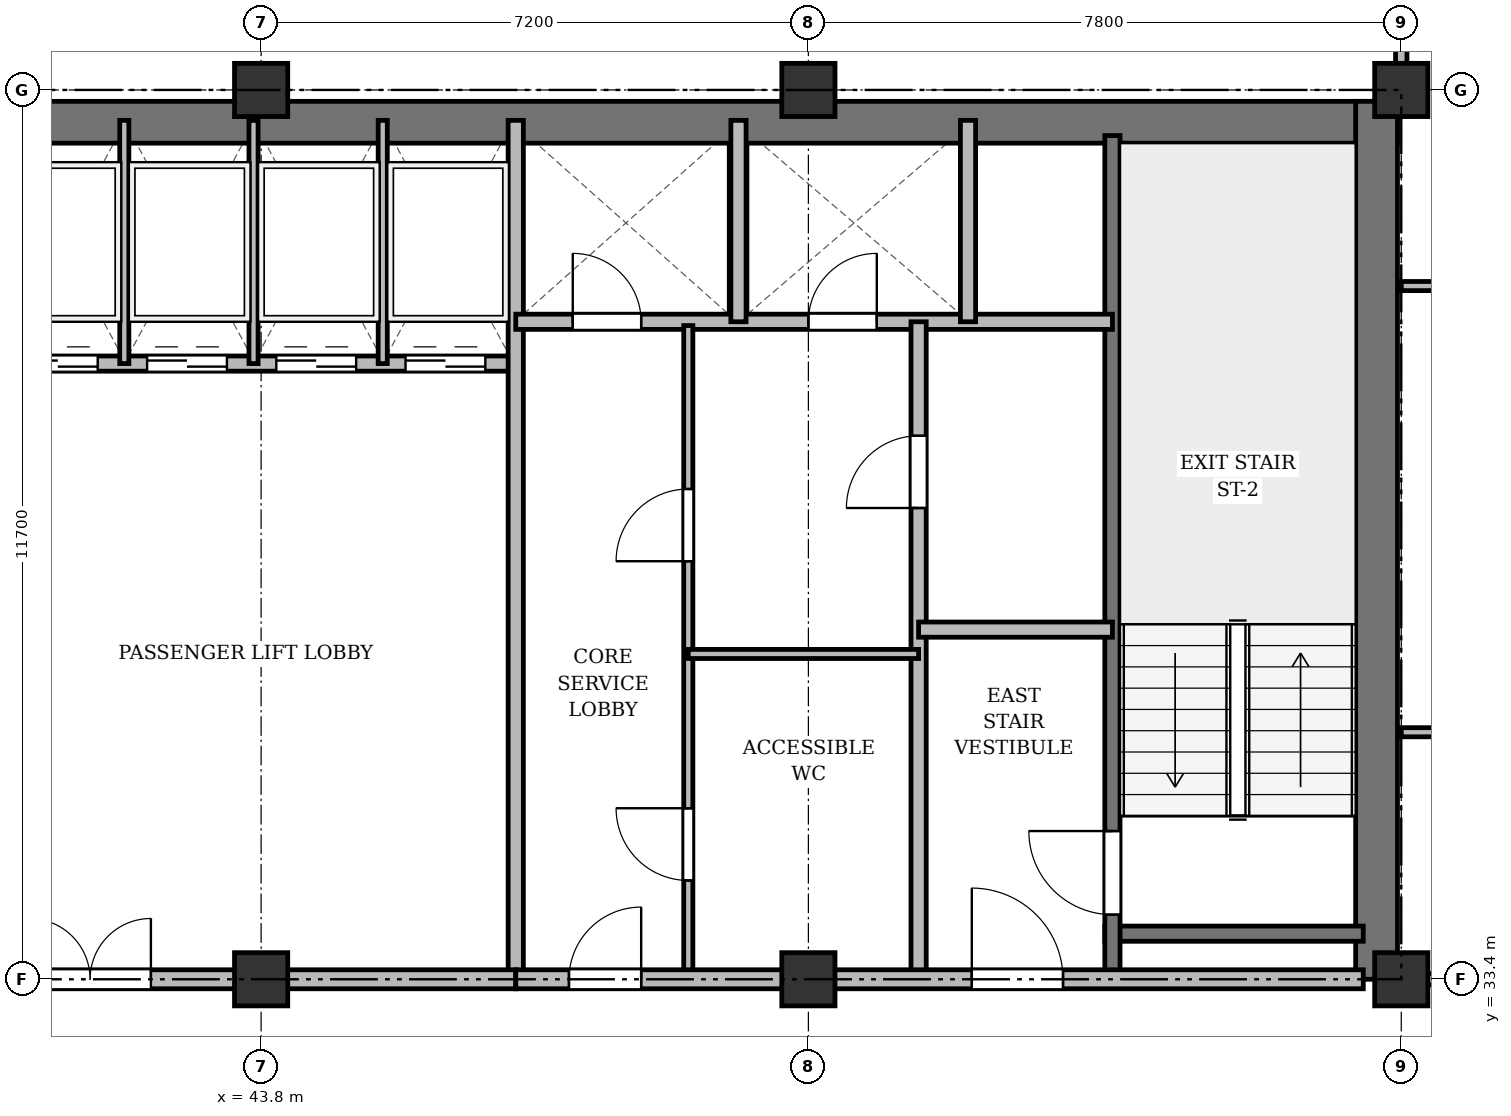
"""IFC4 building model, lengths in metres.
Left out: names, types, materials, properties, quantities, classifications, styles, units other than length and angle.
Written with IfcOpenShell. Run it as: python <this file> out.ifc"""

import sys

from ifc_helpers import new_model, si_unit, direction, frame, frame_2d, origin, origin_2d, place, context, subcontext, project, spatial, rectangle, extrude, source, transform, mapped, element, fill, save


model = new_model("IFC4")
c1 = context("Model", 3, precision=1e-05, world=origin(), true_north=direction((0.0, 1.0)))
c2 = subcontext(c1, "Body", "Model", "MODEL_VIEW")
j1 = project(units=[si_unit("LENGTHUNIT", "METRE"), si_unit("PLANEANGLEUNIT", "RADIAN")], contexts=[c1])
p1 = place(None, origin())
s1 = spatial("IfcSite", under=j1, at=p1, CompositionType="ELEMENT")
p2 = place(p1, origin())
s2 = spatial("IfcBuilding", under=s1, at=p2, CompositionType="ELEMENT")
p3 = place(p2, frame((0.0, 0.0, 226.5)))
s3 = spatial("IfcBuildingStorey", under=s2, at=p3, CompositionType="ELEMENT", Elevation=226.5)
m1 = source(origin(), c2, "Body", "SweptSolid", [
    extrude(rectangle(XDim=0.7, YDim=0.7, at=origin_2d()), origin(), (0.0, 0.0, 1.0), 3.6),
])
for number, where, z_axis, x_axis in (
    (1, (43.8, 33.4, 0.0), (0.0, 0.0, 1.0), (1.0, 0.0, 0.0)),
    (2, (43.8, 45.1, 0.0), (0.0, 0.0, 1.0), (1.0, 0.0, 0.0)),
    (3, (51.0, 33.4, 0.0), (0.0, 0.0, 1.0), (1.0, 0.0, 0.0)),
    (4, (51.0, 45.1, 0.0), (0.0, 0.0, 1.0), (1.0, 0.0, 0.0)),
    (5, (58.8, 33.4, 0.0), (0.0, 0.0, 1.0), (1.0, 0.0, 0.0)),
    (6, (58.8, 45.1, 0.0), (0.0, 0.0, 1.0), (1.0, 0.0, 0.0)),
):
    element("IfcColumn", number, at=place(p3, frame(where, z_axis=z_axis, x_axis=x_axis)), inside=s3, PredefinedType="COLUMN", context=c2, shape_type="MappedRepresentation", body=[
        mapped(m1, transform((0.0, 0.0, 0.0), x_axis=(1.0, 0.0, 0.0), y_axis=(0.0, 1.0, 0.0), z_axis=(0.0, 0.0, 1.0), scale=1.0)),
    ])
p4 = place(p3, frame((15.65, 44.675, 0.0), z_axis=(0.0, 0.0, 1.0), x_axis=(1.0, 0.0, 0.0)))
e7 = element("IfcWall", 7, at=p4, inside=s3, PredefinedType="SHEAR", context=c2, shape_type="SweptSolid", body=[
    extrude(rectangle(XDim=43.1, YDim=0.55, at=frame_2d((21.55, 0.0))), origin(), (0.0, 0.0, 1.0), 3.36),
])
p5 = place(p3, frame((58.475, 33.4, 0.0), z_axis=(0.0, 0.0, 1.0), x_axis=(0.0, 1.0, 0.0)))
e8 = element("IfcWall", 8, at=p5, inside=s3, PredefinedType="SHEAR", context=c2, shape_type="SweptSolid", body=[
    extrude(rectangle(XDim=11.55, YDim=0.55, at=frame_2d((5.775, 0.0))), origin(), (0.0, 0.0, 1.0), 3.36),
])
p6 = place(p3, frame((54.9, 34.0, 0.0), z_axis=(0.0, 0.0, 1.0), x_axis=(1.0, 0.0, 0.0)))
e9 = element("IfcWall", 9, at=p6, inside=s3, PredefinedType="SHEAR", context=c2, shape_type="SweptSolid", body=[
    extrude(rectangle(XDim=3.4, YDim=0.2, at=frame_2d((1.7, 0.0))), origin(), (0.0, 0.0, 1.0), 3.36),
])
p7 = place(p3, frame((55.0, 33.4, 0.0), z_axis=(0.0, 0.0, 1.0), x_axis=(0.0, 1.0, 0.0)))
e10 = element("IfcWall", 10, at=p7, inside=s3, PredefinedType="SHEAR", context=c2, shape_type="SweptSolid", body=[
    extrude(rectangle(XDim=11.1, YDim=0.2, at=frame_2d((5.55, 0.0))), origin(), (0.0, 0.0, 1.0), 3.36),
])
p8 = place(p7, frame((0.85, 0.0, 0.0)))
e11 = element("IfcOpeningElement", 11, at=p8, cuts=e10, PredefinedType="OPENING", context=c2, shape_type="SweptSolid", body=[
    extrude(rectangle(XDim=1.1, YDim=2.15, at=frame_2d((0.55, 1.075))), frame((0.0, 0.11, 0.0), z_axis=(0.0, -1.0, 0.0), x_axis=(1.0, 0.0, 0.0)), (0.0, 0.0, 1.0), 0.22),
])
p9 = place(p3, frame((40.25, 41.5, 0.0), z_axis=(0.0, 0.0, 1.0), x_axis=(1.0, 0.0, 0.0)))
e12 = element("IfcWall", 12, at=p9, inside=s3, PredefinedType="SOLIDWALL", context=c2, shape_type="SweptSolid", body=[
    extrude(rectangle(XDim=6.9, YDim=0.2, at=frame_2d((3.45, 0.0))), origin(), (0.0, 0.0, 1.0), 3.36),
])
p10 = place(p9, frame((0.35, 0.0, 0.0)))
e13 = element("IfcOpeningElement", 13, at=p10, cuts=e12, PredefinedType="OPENING", context=c2, shape_type="SweptSolid", body=[
    extrude(rectangle(XDim=1.05, YDim=2.15, at=frame_2d((0.525, 1.075))), frame((0.0, 0.11, 0.0), z_axis=(0.0, -1.0, 0.0), x_axis=(1.0, 0.0, 0.0)), (0.0, 0.0, 1.0), 0.22),
])
p11 = place(p9, frame((2.05, 0.0, 0.0)))
e14 = element("IfcOpeningElement", 14, at=p11, cuts=e12, PredefinedType="OPENING", context=c2, shape_type="SweptSolid", body=[
    extrude(rectangle(XDim=1.05, YDim=2.15, at=frame_2d((0.525, 1.075))), frame((0.0, 0.11, 0.0), z_axis=(0.0, -1.0, 0.0), x_axis=(1.0, 0.0, 0.0)), (0.0, 0.0, 1.0), 0.22),
])
p12 = place(p9, frame((3.75, 0.0, 0.0)))
e15 = element("IfcOpeningElement", 15, at=p12, cuts=e12, PredefinedType="OPENING", context=c2, shape_type="SweptSolid", body=[
    extrude(rectangle(XDim=1.05, YDim=2.15, at=frame_2d((0.525, 1.075))), frame((0.0, 0.11, 0.0), z_axis=(0.0, -1.0, 0.0), x_axis=(1.0, 0.0, 0.0)), (0.0, 0.0, 1.0), 0.22),
])
p13 = place(p9, frame((5.45, 0.0, 0.0)))
e16 = element("IfcOpeningElement", 16, at=p13, cuts=e12, PredefinedType="OPENING", context=c2, shape_type="SweptSolid", body=[
    extrude(rectangle(XDim=1.05, YDim=2.15, at=frame_2d((0.525, 1.075))), frame((0.0, 0.11, 0.0), z_axis=(0.0, -1.0, 0.0), x_axis=(1.0, 0.0, 0.0)), (0.0, 0.0, 1.0), 0.22),
])
for number, where, z_axis, x_axis in (
    (17, (42.0, 41.5, 0.0), (0.0, 0.0, 1.0), (0.0, 1.0, 0.0)),
    (18, (43.7, 41.5, 0.0), (0.0, 0.0, 1.0), (0.0, 1.0, 0.0)),
    (19, (45.4, 41.5, 0.0), (0.0, 0.0, 1.0), (0.0, 1.0, 0.0)),
):
    element("IfcWall", number, at=place(p3, frame(where, z_axis=z_axis, x_axis=x_axis)), inside=s3, PredefinedType="PARTITIONING", context=c2, shape_type="SweptSolid", body=[
        extrude(rectangle(XDim=3.2, YDim=0.12, at=frame_2d((1.6, 0.0))), origin(), (0.0, 0.0, 1.0), 3.36),
    ])
p14 = place(p3, frame((47.15, 33.4, 0.0), z_axis=(0.0, 0.0, 1.0), x_axis=(0.0, 1.0, 0.0)))
e20 = element("IfcWall", 20, at=p14, inside=s3, PredefinedType="SOLIDWALL", context=c2, shape_type="SweptSolid", body=[
    extrude(rectangle(XDim=11.3, YDim=0.2, at=frame_2d((5.65, 0.0))), origin(), (0.0, 0.0, 1.0), 2.91),
])
p15 = place(p3, frame((40.1, 33.4, 0.0), z_axis=(0.0, 0.0, 1.0), x_axis=(1.0, 0.0, 0.0)))
e21 = element("IfcWall", 21, at=p15, inside=s3, PredefinedType="PARTITIONING", context=c2, shape_type="SweptSolid", body=[
    extrude(rectangle(XDim=7.05, YDim=0.25, at=frame_2d((3.525, 0.0))), origin(), (0.0, 0.0, 1.0), 2.91),
])
p16 = place(p15, frame((0.65, 0.0, 0.0)))
e22 = element("IfcOpeningElement", 22, at=p16, cuts=e21, PredefinedType="OPENING", context=c2, shape_type="SweptSolid", body=[
    extrude(rectangle(XDim=1.6, YDim=2.2, at=frame_2d((0.8, 1.1))), frame((0.0, 0.135, 0.0), z_axis=(0.0, -1.0, 0.0), x_axis=(1.0, 0.0, 0.0)), (0.0, 0.0, 1.0), 0.27),
])
p17 = place(p3, frame((47.15, 42.05, 0.0), z_axis=(0.0, 0.0, 1.0), x_axis=(1.0, 0.0, 0.0)))
e23 = element("IfcWall", 23, at=p17, inside=s3, PredefinedType="SOLIDWALL", context=c2, shape_type="SweptSolid", body=[
    extrude(rectangle(XDim=7.85, YDim=0.2, at=frame_2d((3.925, 0.0))), origin(), (0.0, 0.0, 1.0), 2.86),
])
p18 = place(p17, frame((0.75, 0.0, 0.0)))
e24 = element("IfcOpeningElement", 24, at=p18, cuts=e23, PredefinedType="OPENING", context=c2, shape_type="SweptSolid", body=[
    extrude(rectangle(XDim=0.9, YDim=2.1, at=frame_2d((0.45, 1.05))), frame((0.0, 0.11, 0.0), z_axis=(0.0, -1.0, 0.0), x_axis=(1.0, 0.0, 0.0)), (0.0, 0.0, 1.0), 0.22),
])
p19 = place(p17, frame((3.85, 0.0, 0.0)))
e25 = element("IfcOpeningElement", 25, at=p19, cuts=e23, PredefinedType="OPENING", context=c2, shape_type="SweptSolid", body=[
    extrude(rectangle(XDim=0.9, YDim=2.1, at=frame_2d((0.45, 1.05))), frame((0.0, 0.11, 0.0), z_axis=(0.0, -1.0, 0.0), x_axis=(1.0, 0.0, 0.0)), (0.0, 0.0, 1.0), 0.22),
])
for number, where, z_axis, x_axis in (
    (26, (50.08, 42.05, 0.0), (0.0, 0.0, 1.0), (0.0, 1.0, 0.0)),
    (27, (53.1, 42.05, 0.0), (0.0, 0.0, 1.0), (0.0, 1.0, 0.0)),
):
    element("IfcWall", number, at=place(p3, frame(where, z_axis=z_axis, x_axis=x_axis)), inside=s3, PredefinedType="SOLIDWALL", context=c2, shape_type="SweptSolid", body=[
        extrude(rectangle(XDim=2.65, YDim=0.2, at=frame_2d((1.325, 0.0))), origin(), (0.0, 0.0, 1.0), 3.36),
    ])
p20 = place(p3, frame((52.45, 33.4, 0.0), z_axis=(0.0, 0.0, 1.0), x_axis=(0.0, 1.0, 0.0)))
e28 = element("IfcWall", 28, at=p20, inside=s3, PredefinedType="PARTITIONING", context=c2, shape_type="SweptSolid", body=[
    extrude(rectangle(XDim=8.65, YDim=0.2, at=frame_2d((4.325, 0.0))), origin(), (0.0, 0.0, 1.0), 2.91),
])
p21 = place(p20, frame((6.2, 0.0, 0.0)))
e29 = element("IfcOpeningElement", 29, at=p21, cuts=e28, PredefinedType="OPENING", context=c2, shape_type="SweptSolid", body=[
    extrude(rectangle(XDim=0.95, YDim=2.15, at=frame_2d((0.475, 1.075))), frame((0.0, 0.11, 0.0), z_axis=(0.0, -1.0, 0.0), x_axis=(1.0, 0.0, 0.0)), (0.0, 0.0, 1.0), 0.22),
])
p22 = place(p3, frame((52.45, 38.0, 0.0), z_axis=(0.0, 0.0, 1.0), x_axis=(1.0, 0.0, 0.0)))
e30 = element("IfcWall", 30, at=p22, inside=s3, PredefinedType="PARTITIONING", context=c2, shape_type="SweptSolid", body=[
    extrude(rectangle(XDim=2.55, YDim=0.2, at=frame_2d((1.275, 0.0))), origin(), (0.0, 0.0, 1.0), 3.36),
])
p23 = place(p3, frame((49.42, 33.4, 0.0), z_axis=(0.0, 0.0, 1.0), x_axis=(0.0, 1.0, 0.0)))
e31 = element("IfcWall", 31, at=p23, inside=s3, PredefinedType="PARTITIONING", context=c2, shape_type="SweptSolid", body=[
    extrude(rectangle(XDim=8.6, YDim=0.12, at=frame_2d((4.3, 0.0))), origin(), (0.0, 0.0, 1.0), 2.91),
])
p24 = place(p23, frame((1.3, 0.0, 0.0)))
e32 = element("IfcOpeningElement", 32, at=p24, cuts=e31, PredefinedType="OPENING", context=c2, shape_type="SweptSolid", body=[
    extrude(rectangle(XDim=0.95, YDim=2.15, at=frame_2d((0.475, 1.075))), frame((0.0, 0.07, 0.0), z_axis=(0.0, -1.0, 0.0), x_axis=(1.0, 0.0, 0.0)), (0.0, 0.0, 1.0), 0.14),
])
p25 = place(p23, frame((5.5, 0.0, 0.0)))
e33 = element("IfcOpeningElement", 33, at=p25, cuts=e31, PredefinedType="OPENING", context=c2, shape_type="SweptSolid", body=[
    extrude(rectangle(XDim=0.95, YDim=2.15, at=frame_2d((0.475, 1.075))), frame((0.0, 0.07, 0.0), z_axis=(0.0, -1.0, 0.0), x_axis=(1.0, 0.0, 0.0)), (0.0, 0.0, 1.0), 0.14),
])
p26 = place(p3, frame((49.42, 37.68, 0.0), z_axis=(0.0, 0.0, 1.0), x_axis=(1.0, 0.0, 0.0)))
e34 = element("IfcWall", 34, at=p26, inside=s3, PredefinedType="PARTITIONING", context=c2, shape_type="SweptSolid", body=[
    extrude(rectangle(XDim=3.03, YDim=0.12, at=frame_2d((1.515, 0.0))), origin(), (0.0, 0.0, 1.0), 2.86),
])
p27 = place(p3, frame((47.15, 33.4, 0.0), z_axis=(0.0, 0.0, 1.0), x_axis=(1.0, 0.0, 0.0)))
e35 = element("IfcWall", 35, at=p27, inside=s3, PredefinedType="PARTITIONING", context=c2, shape_type="SweptSolid", body=[
    extrude(rectangle(XDim=11.15, YDim=0.25, at=frame_2d((5.575, 0.0))), origin(), (0.0, 0.0, 1.0), 2.91),
])
p28 = place(p27, frame((0.7, 0.0, 0.0)))
e36 = element("IfcOpeningElement", 36, at=p28, cuts=e35, PredefinedType="OPENING", context=c2, shape_type="SweptSolid", body=[
    extrude(rectangle(XDim=0.95, YDim=2.15, at=frame_2d((0.475, 1.075))), frame((0.0, 0.135, 0.0), z_axis=(0.0, -1.0, 0.0), x_axis=(1.0, 0.0, 0.0)), (0.0, 0.0, 1.0), 0.27),
])
p29 = place(p27, frame((6.0, 0.0, 0.0)))
e37 = element("IfcOpeningElement", 37, at=p29, cuts=e35, PredefinedType="OPENING", context=c2, shape_type="SweptSolid", body=[
    extrude(rectangle(XDim=1.2, YDim=2.15, at=frame_2d((0.6, 1.075))), frame((0.0, 0.135, 0.0), z_axis=(0.0, -1.0, 0.0), x_axis=(1.0, 0.0, 0.0)), (0.0, 0.0, 1.0), 0.27),
])
p30 = place(p3, frame((58.8, 36.65, 0.0), z_axis=(0.0, 0.0, 1.0), x_axis=(1.0, 0.0, 0.0)))
e38 = element("IfcWall", 38, at=p30, inside=s3, PredefinedType="PARTITIONING", context=c2, shape_type="SweptSolid", body=[
    extrude(rectangle(XDim=2.45, YDim=0.12, at=frame_2d((1.225, 0.0))), origin(), (0.0, 0.0, 1.0), 2.86),
])
p31 = place(p3, frame((58.8, 42.52, 0.0), z_axis=(0.0, 0.0, 1.0), x_axis=(1.0, 0.0, 0.0)))
e39 = element("IfcWall", 39, at=p31, inside=s3, PredefinedType="PARTITIONING", context=c2, shape_type="SweptSolid", body=[
    extrude(rectangle(XDim=3.675, YDim=0.12, at=frame_2d((1.837, 0.0))), origin(), (0.0, 0.0, 1.0), 2.86),
])
p32 = place(p31, frame((1.559, 0.0, 0.0)))
e40 = element("IfcOpeningElement", 40, at=p32, cuts=e39, PredefinedType="OPENING", context=c2, shape_type="SweptSolid", body=[
    extrude(rectangle(XDim=0.95, YDim=2.15, at=frame_2d((0.475, 1.075))), frame((0.0, 0.07, 0.0), z_axis=(0.0, -1.0, 0.0), x_axis=(1.0, 0.0, 0.0)), (0.0, 0.0, 1.0), 0.14),
])
p33 = place(p3, frame((58.8, 33.4, 0.0), z_axis=(0.0, 0.0, 1.0), x_axis=(1.0, 0.0, 0.0)))
e41 = element("IfcWall", 41, at=p33, inside=s3, PredefinedType="PARTITIONING", context=c2, shape_type="SweptSolid", body=[
    extrude(rectangle(XDim=7.35, YDim=0.15, at=frame_2d((3.675, 0.0))), origin(), (0.0, 0.0, 1.0), 2.91),
])
p34 = place(p33, frame((4.275, 0.0, 0.0)))
e42 = element("IfcOpeningElement", 42, at=p34, cuts=e41, PredefinedType="OPENING", context=c2, shape_type="SweptSolid", body=[
    extrude(rectangle(XDim=0.95, YDim=2.15, at=frame_2d((0.475, 1.075))), frame((0.0, 0.085, 0.0), z_axis=(0.0, -1.0, 0.0), x_axis=(1.0, 0.0, 0.0)), (0.0, 0.0, 1.0), 0.17),
])
p35 = place(p3, frame((58.8, 44.75, 0.0), z_axis=(0.0, 0.0, 1.0), x_axis=(0.0, 1.0, 0.0)))
e43 = element("IfcWall", 43, at=p35, inside=s3, PredefinedType="PARTITIONING", context=c2, shape_type="SweptSolid", body=[
    extrude(rectangle(XDim=3.61, YDim=0.15, at=frame_2d((1.805, 0.0))), origin(), (0.0, 0.0, 1.0), 2.86),
])
p36 = place(p35, frame((1.1, 0.0, 0.0)))
e44 = element("IfcOpeningElement", 44, at=p36, cuts=e43, PredefinedType="OPENING", context=c2, shape_type="SweptSolid", body=[
    extrude(rectangle(XDim=0.95, YDim=2.15, at=frame_2d((0.475, 1.075))), frame((0.0, 0.085, 0.0), z_axis=(0.0, -1.0, 0.0), x_axis=(1.0, 0.0, 0.0)), (0.0, 0.0, 1.0), 0.17),
])
m2 = source(origin(), c2, "Body", "SweptSolid", [
    extrude(rectangle(XDim=1.1, YDim=2.15, at=frame_2d((0.55, 1.075))), frame((0.0, 0.025, 0.0), z_axis=(0.0, -1.0, 0.0), x_axis=(1.0, 0.0, 0.0)), (0.0, 0.0, 1.0), 0.05),
])
p37 = place(p8, origin())
e45 = element("IfcDoor", 45, at=p37, inside=s3, OperationType="SINGLE_SWING_RIGHT", PredefinedType="DOOR", context=c2, shape_type="MappedRepresentation", body=[
    mapped(m2, transform((0.0, 0.0, 0.0), x_axis=(1.0, 0.0, 0.0), y_axis=(0.0, 1.0, 0.0), z_axis=(0.0, 0.0, 1.0), scale=1.0)),
])
fill(e11, e45)
m3 = source(origin(), c2, "Body", "SweptSolid", [
    extrude(rectangle(XDim=1.05, YDim=2.15, at=frame_2d((0.525, 1.075))), frame((0.0, 0.025, 0.0), z_axis=(0.0, -1.0, 0.0), x_axis=(1.0, 0.0, 0.0)), (0.0, 0.0, 1.0), 0.05),
])
p38 = place(p10, origin())
e46 = element("IfcDoor", 46, at=p38, inside=s3, OperationType="DOUBLE_DOOR_SLIDING", PredefinedType="DOOR", context=c2, shape_type="MappedRepresentation", body=[
    mapped(m3, transform((0.0, 0.0, 0.0), x_axis=(1.0, 0.0, 0.0), y_axis=(0.0, 1.0, 0.0), z_axis=(0.0, 0.0, 1.0), scale=1.0)),
])
fill(e13, e46)
p39 = place(p11, origin())
e47 = element("IfcDoor", 47, at=p39, inside=s3, OperationType="DOUBLE_DOOR_SLIDING", PredefinedType="DOOR", context=c2, shape_type="MappedRepresentation", body=[
    mapped(m3, transform((0.0, 0.0, 0.0), x_axis=(1.0, 0.0, 0.0), y_axis=(0.0, 1.0, 0.0), z_axis=(0.0, 0.0, 1.0), scale=1.0)),
])
fill(e14, e47)
p40 = place(p12, origin())
e48 = element("IfcDoor", 48, at=p40, inside=s3, OperationType="DOUBLE_DOOR_SLIDING", PredefinedType="DOOR", context=c2, shape_type="MappedRepresentation", body=[
    mapped(m3, transform((0.0, 0.0, 0.0), x_axis=(1.0, 0.0, 0.0), y_axis=(0.0, 1.0, 0.0), z_axis=(0.0, 0.0, 1.0), scale=1.0)),
])
fill(e15, e48)
p41 = place(p13, origin())
e49 = element("IfcDoor", 49, at=p41, inside=s3, OperationType="DOUBLE_DOOR_SLIDING", PredefinedType="DOOR", context=c2, shape_type="MappedRepresentation", body=[
    mapped(m3, transform((0.0, 0.0, 0.0), x_axis=(1.0, 0.0, 0.0), y_axis=(0.0, 1.0, 0.0), z_axis=(0.0, 0.0, 1.0), scale=1.0)),
])
fill(e16, e49)
m4 = source(origin(), c2, "Body", "SweptSolid", [
    extrude(rectangle(XDim=1.6, YDim=2.2, at=frame_2d((0.8, 1.1))), frame((0.0, 0.025, 0.0), z_axis=(0.0, -1.0, 0.0), x_axis=(1.0, 0.0, 0.0)), (0.0, 0.0, 1.0), 0.05),
])
p42 = place(p16, origin())
e50 = element("IfcDoor", 50, at=p42, inside=s3, OperationType="DOUBLE_DOOR_SINGLE_SWING", PredefinedType="DOOR", context=c2, shape_type="MappedRepresentation", body=[
    mapped(m4, transform((0.0, 0.0, 0.0), x_axis=(1.0, 0.0, 0.0), y_axis=(0.0, 1.0, 0.0), z_axis=(0.0, 0.0, 1.0), scale=1.0)),
])
fill(e22, e50)
m5 = source(origin(), c2, "Body", "SweptSolid", [
    extrude(rectangle(XDim=0.9, YDim=2.1, at=frame_2d((0.45, 1.05))), frame((0.0, 0.025, 0.0), z_axis=(0.0, -1.0, 0.0), x_axis=(1.0, 0.0, 0.0)), (0.0, 0.0, 1.0), 0.05),
])
p43 = place(p18, origin())
e51 = element("IfcDoor", 51, at=p43, inside=s3, OperationType="SINGLE_SWING_LEFT", PredefinedType="DOOR", context=c2, shape_type="MappedRepresentation", body=[
    mapped(m5, transform((0.0, 0.0, 0.0), x_axis=(1.0, 0.0, 0.0), y_axis=(0.0, 1.0, 0.0), z_axis=(0.0, 0.0, 1.0), scale=1.0)),
])
fill(e24, e51)
p44 = place(p19, origin())
e52 = element("IfcDoor", 52, at=p44, inside=s3, OperationType="SINGLE_SWING_RIGHT", PredefinedType="DOOR", context=c2, shape_type="MappedRepresentation", body=[
    mapped(m5, transform((0.0, 0.0, 0.0), x_axis=(1.0, 0.0, 0.0), y_axis=(0.0, 1.0, 0.0), z_axis=(0.0, 0.0, 1.0), scale=1.0)),
])
fill(e25, e52)
m6 = source(origin(), c2, "Body", "SweptSolid", [
    extrude(rectangle(XDim=0.95, YDim=2.15, at=frame_2d((0.475, 1.075))), frame((0.0, 0.025, 0.0), z_axis=(0.0, -1.0, 0.0), x_axis=(1.0, 0.0, 0.0)), (0.0, 0.0, 1.0), 0.05),
])
p45 = place(p21, origin())
e53 = element("IfcDoor", 53, at=p45, inside=s3, OperationType="SINGLE_SWING_LEFT", PredefinedType="DOOR", context=c2, shape_type="MappedRepresentation", body=[
    mapped(m6, transform((0.0, 0.0, 0.0), x_axis=(1.0, 0.0, 0.0), y_axis=(0.0, 1.0, 0.0), z_axis=(0.0, 0.0, 1.0), scale=1.0)),
])
fill(e29, e53)
p46 = place(p24, origin())
e54 = element("IfcDoor", 54, at=p46, inside=s3, OperationType="SINGLE_SWING_RIGHT", PredefinedType="DOOR", context=c2, shape_type="MappedRepresentation", body=[
    mapped(m6, transform((0.0, 0.0, 0.0), x_axis=(1.0, 0.0, 0.0), y_axis=(0.0, 1.0, 0.0), z_axis=(0.0, 0.0, 1.0), scale=1.0)),
])
fill(e32, e54)
p47 = place(p25, origin())
e55 = element("IfcDoor", 55, at=p47, inside=s3, OperationType="SINGLE_SWING_LEFT", PredefinedType="DOOR", context=c2, shape_type="MappedRepresentation", body=[
    mapped(m6, transform((0.0, 0.0, 0.0), x_axis=(1.0, 0.0, 0.0), y_axis=(0.0, 1.0, 0.0), z_axis=(0.0, 0.0, 1.0), scale=1.0)),
])
fill(e33, e55)
p48 = place(p28, origin())
e56 = element("IfcDoor", 56, at=p48, inside=s3, OperationType="SINGLE_SWING_RIGHT", PredefinedType="DOOR", context=c2, shape_type="MappedRepresentation", body=[
    mapped(m6, transform((0.0, 0.0, 0.0), x_axis=(1.0, 0.0, 0.0), y_axis=(0.0, 1.0, 0.0), z_axis=(0.0, 0.0, 1.0), scale=1.0)),
])
fill(e36, e56)
m7 = source(origin(), c2, "Body", "SweptSolid", [
    extrude(rectangle(XDim=1.2, YDim=2.15, at=frame_2d((0.6, 1.075))), frame((0.0, 0.025, 0.0), z_axis=(0.0, -1.0, 0.0), x_axis=(1.0, 0.0, 0.0)), (0.0, 0.0, 1.0), 0.05),
])
p49 = place(p29, origin())
e57 = element("IfcDoor", 57, at=p49, inside=s3, OperationType="SINGLE_SWING_LEFT", PredefinedType="DOOR", context=c2, shape_type="MappedRepresentation", body=[
    mapped(m7, transform((0.0, 0.0, 0.0), x_axis=(1.0, 0.0, 0.0), y_axis=(0.0, 1.0, 0.0), z_axis=(0.0, 0.0, 1.0), scale=1.0)),
])
fill(e37, e57)
save(model, sys.argv[1])
